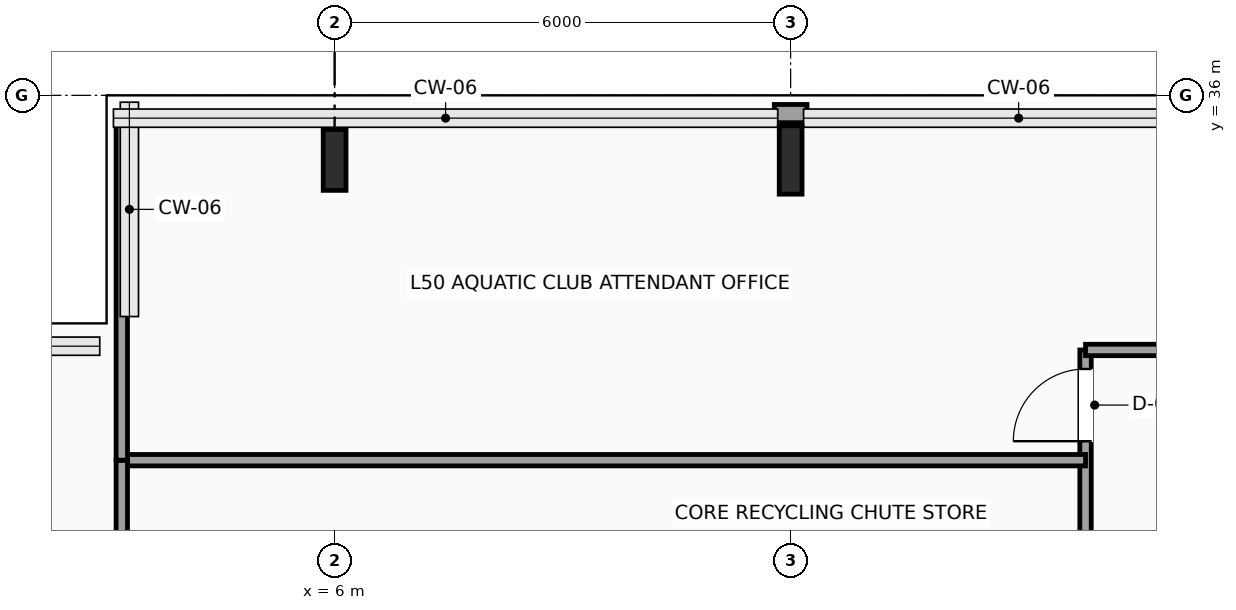
"""IFC4 building model, lengths in metres.
Left out: names, types, materials, properties, quantities, classifications, styles, units other than length and angle.
Written with IfcOpenShell. Run it as: python <this file> out.ifc"""

import sys

from ifc_helpers import new_model, si_unit, direction, frame, frame_2d, origin, origin_2d, place, context, subcontext, project, spatial, rectangle, i_section, extrude, element, fill, save


model = new_model("IFC4")
c1 = context("Model", 3, precision=1e-05, world=origin(), true_north=direction((0.0, 1.0)))
c2 = subcontext(c1, "Body", "Model", "MODEL_VIEW")
j1 = project(units=[si_unit("LENGTHUNIT", "METRE"), si_unit("PLANEANGLEUNIT", "RADIAN")], contexts=[c1])
p1 = place(None, origin())
s1 = spatial("IfcSite", under=j1, at=p1, CompositionType="ELEMENT")
p2 = place(p1, origin())
s2 = spatial("IfcBuilding", under=s1, at=p2, CompositionType="ELEMENT")
p3 = place(p2, frame((0.0, 0.0, 204.0)))
s3 = spatial("IfcBuildingStorey", under=s2, at=p3, CompositionType="ELEMENT", Elevation=204.0)
p4 = place(p3, frame((6.0, 35.15, 0.0), z_axis=(0.0, 0.0, 1.0), x_axis=(1.0, 0.0, 0.0)))
e1 = element("IfcColumn", 1, at=p4, inside=s3, PredefinedType="COLUMN", context=c2, shape_type="SweptSolid", body=[
    extrude(i_section(OverallWidth=0.3, OverallDepth=0.8, WebThickness=0.018, FlangeThickness=0.033, FilletRadius=0.03, at=origin_2d()), origin(), (0.0, 0.0, 1.0), 4.65),
])
p5 = place(p3, frame((12.0, 35.15, 0.0), z_axis=(0.0, 0.0, 1.0), x_axis=(1.0, 0.0, 0.0)))
e2 = element("IfcColumn", 2, at=p5, inside=s3, PredefinedType="COLUMN", context=c2, shape_type="SweptSolid", body=[
    extrude(i_section(OverallWidth=0.3, OverallDepth=0.9, WebThickness=0.019, FlangeThickness=0.035, FilletRadius=0.03, at=origin_2d()), origin(), (0.0, 0.0, 1.0), 4.65),
])
p6 = place(p3, frame((11.785, 35.76, 0.0), z_axis=(0.0, 0.0, 1.0), x_axis=(1.0, 0.0, 0.0)))
e3 = element("IfcWall", 3, at=p6, inside=s3, PredefinedType="SOLIDWALL", context=c2, shape_type="SweptSolid", body=[
    extrude(rectangle(XDim=0.43, YDim=0.24, at=frame_2d((0.215, 0.0))), origin(), (0.0, 0.0, 1.0), 4.44),
])
p7 = place(p3, frame((15.88, 30.25, 0.0), z_axis=(0.0, 0.0, 1.0), x_axis=(0.0, 1.0, 0.0)))
e4 = element("IfcWall", 4, at=p7, inside=s3, PredefinedType="PARTITIONING", context=c2, shape_type="SweptSolid", body=[
    extrude(rectangle(XDim=2.4, YDim=0.15, at=frame_2d((1.2, 0.0))), origin(), (0.0, 0.0, 1.0), 4.44),
])
p8 = place(p7, frame((1.2, 0.0, 0.0)))
e5 = element("IfcOpeningElement", 5, at=p8, cuts=e4, PredefinedType="OPENING", context=c2, shape_type="SweptSolid", body=[
    extrude(rectangle(XDim=0.95, YDim=2.15, at=frame_2d((0.475, 1.075))), frame((0.0, 0.085, 0.0), z_axis=(0.0, -1.0, 0.0), x_axis=(1.0, 0.0, 0.0)), (0.0, 0.0, 1.0), 0.17),
])
p9 = place(p3, frame((15.88, 32.65, 0.0), z_axis=(0.0, 0.0, 1.0), x_axis=(1.0, 0.0, 0.0)))
e6 = element("IfcWall", 6, at=p9, inside=s3, PredefinedType="PARTITIONING", context=c2, shape_type="SweptSolid", body=[
    extrude(rectangle(XDim=2.22, YDim=0.15, at=frame_2d((1.11, 0.0))), origin(), (0.0, 0.0, 1.0), 4.44),
])
p10 = place(p3, frame((3.2, 31.2, 0.0), z_axis=(0.0, 0.0, 1.0), x_axis=(1.0, 0.0, 0.0)))
e7 = element("IfcWall", 7, at=p10, inside=s3, PredefinedType="PARTITIONING", context=c2, shape_type="SweptSolid", body=[
    extrude(rectangle(XDim=12.68, YDim=0.15, at=frame_2d((6.34, 0.0))), origin(), (0.0, 0.0, 1.0), 4.44),
])
p11 = place(p3, frame((3.2, 27.65, 0.0), z_axis=(0.0, 0.0, 1.0), x_axis=(0.0, 1.0, 0.0)))
e8 = element("IfcWall", 8, at=p11, inside=s3, PredefinedType="PARTITIONING", context=c2, shape_type="SweptSolid", body=[
    extrude(rectangle(XDim=3.55, YDim=0.15, at=frame_2d((1.775, 0.0))), origin(), (0.0, 0.0, 1.0), 4.44),
])
p12 = place(p3, frame((3.2, 31.2, 0.0), z_axis=(0.0, 0.0, 1.0), x_axis=(0.0, 1.0, 0.0)))
e9 = element("IfcWall", 9, at=p12, inside=s3, PredefinedType="PARTITIONING", context=c2, shape_type="SweptSolid", body=[
    extrude(rectangle(XDim=4.5, YDim=0.15, at=frame_2d((2.25, 0.0))), origin(), (0.0, 0.0, 1.0), 4.44),
])
p13 = place(p8, origin())
e10 = element("IfcDoor", 10, at=p13, inside=s3, OperationType="SINGLE_SWING_LEFT", PredefinedType="DOOR", context=c2, shape_type="SweptSolid", body=[
    extrude(rectangle(XDim=0.95, YDim=2.15, at=frame_2d((0.475, 1.075))), frame((0.0, 0.025, 0.0), z_axis=(0.0, -1.0, 0.0), x_axis=(1.0, 0.0, 0.0)), (0.0, 0.0, 1.0), 0.05),
])
fill(e5, e10)
save(model, sys.argv[1])
